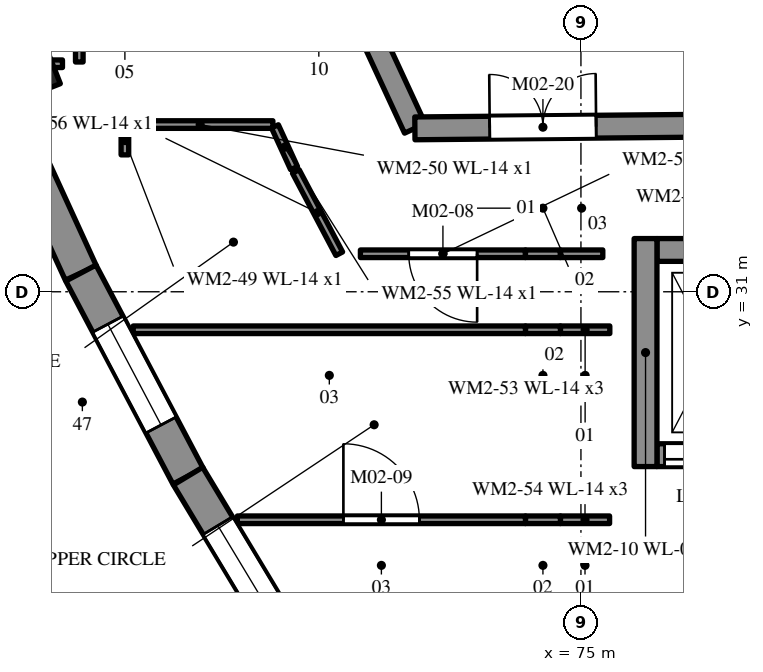
"""IFC4 building model, lengths in metres.
Left out: names, types, materials, properties, quantities, classifications, styles, units other than length and angle.
Written with IfcOpenShell. Run it as: python <this file> out.ifc"""

import sys

from ifc_helpers import new_model, si_unit, direction, frame, frame_2d, origin, origin_2d, place, context, subcontext, project, spatial, rectangle, extrude, element, fill, save


model = new_model("IFC4")
c1 = context("Model", 3, precision=1e-05, world=origin(), true_north=direction((0.0, 1.0)))
c2 = subcontext(c1, "Body", "Model", "MODEL_VIEW")
j1 = project(units=[si_unit("LENGTHUNIT", "METRE"), si_unit("PLANEANGLEUNIT", "RADIAN")], contexts=[c1])
p1 = place(None, origin())
s1 = spatial("IfcSite", under=j1, at=p1, CompositionType="ELEMENT")
p2 = place(p1, origin())
s2 = spatial("IfcBuilding", under=s1, at=p2, CompositionType="ELEMENT")
p3 = place(p2, frame((0.0, 0.0, 10.2)))
s3 = spatial("IfcBuildingStorey", under=s2, at=p3, CompositionType="ELEMENT", Elevation=10.2)
p4 = place(p3, frame((67.163, 33.993, 0.0), z_axis=(0.0, 0.0, 1.0), x_axis=(0.416407051835, -0.909178292296, 0.0)))
e1 = element("IfcWall", 1, at=p4, inside=s3, PredefinedType="SOLIDWALL", context=c2, shape_type="SweptSolid", body=[
    extrude(rectangle(XDim=3.021, YDim=0.45, at=frame_2d((1.511, 0.0))), origin(), (0.0, 0.0, 1.0), 4.6),
])
p5 = place(p3, frame((68.421, 31.246, 0.0), z_axis=(0.0, 0.0, 1.0), x_axis=(0.466728769487, -0.884400506407, 0.0)))
e2 = element("IfcWall", 2, at=p5, inside=s3, PredefinedType="SOLIDWALL", context=c2, shape_type="SweptSolid", body=[
    extrude(rectangle(XDim=3.021, YDim=0.45, at=frame_2d((1.51, 0.0))), origin(), (0.0, 0.0, 1.0), 4.6),
])
p6 = place(p5, frame((0.76, 0.0, 0.9)))
e3 = element("IfcOpeningElement", 3, at=p6, cuts=e2, PredefinedType="OPENING", context=c2, shape_type="SweptSolid", body=[
    extrude(rectangle(XDim=1.5, YDim=2.1, at=frame_2d((0.75, 1.05))), frame((0.0, 0.235, 0.0), z_axis=(0.0, -1.0, 0.0), x_axis=(1.0, 0.0, 0.0)), (0.0, 0.0, 1.0), 0.47),
])
p7 = place(p3, frame((69.831, 28.575, 0.0), z_axis=(0.0, 0.0, 1.0), x_axis=(0.515636119523, -0.856807675177, 0.0)))
e4 = element("IfcWall", 4, at=p7, inside=s3, PredefinedType="SOLIDWALL", context=c2, shape_type="SweptSolid", body=[
    extrude(rectangle(XDim=3.021, YDim=0.45, at=frame_2d((1.511, 0.0))), origin(), (0.0, 0.0, 1.0), 4.6),
])
p8 = place(p7, frame((0.76, 0.0, 0.9)))
e5 = element("IfcOpeningElement", 5, at=p8, cuts=e4, PredefinedType="OPENING", context=c2, shape_type="SweptSolid", body=[
    extrude(rectangle(XDim=1.5, YDim=2.1, at=frame_2d((0.75, 1.05))), frame((0.0, 0.235, 0.0), z_axis=(0.0, -1.0, 0.0), x_axis=(1.0, 0.0, 0.0)), (0.0, 0.0, 1.0), 0.47),
])
p9 = place(p3, frame((71.558, 35.865, 0.0), z_axis=(0.0, 0.0, 1.0), x_axis=(0.420315192535, -0.907378167538, 0.0)))
e6 = element("IfcWall", 6, at=p9, inside=s3, PredefinedType="SHEAR", context=c2, shape_type="SweptSolid", body=[
    extrude(rectangle(XDim=2.992, YDim=0.3, at=frame_2d((1.496, 0.0))), origin(), (0.0, 0.0, 1.0), 4.6),
])
p10 = place(p3, frame((72.815, 33.15, 0.0), z_axis=(0.0, 0.0, 1.0), x_axis=(0.999957788763, 0.009188073348, 0.0)))
e7 = element("IfcWall", 7, at=p10, inside=s3, PredefinedType="SHEAR", context=c2, shape_type="SweptSolid", body=[
    extrude(rectangle(XDim=22.479, YDim=0.3, at=frame_2d((11.24, 0.0))), origin(), (0.0, 0.0, 1.0), 4.6),
])
p11 = place(p10, frame((0.985, 0.0, 0.0)))
e8 = element("IfcOpeningElement", 8, at=p11, cuts=e7, PredefinedType="OPENING", context=c2, shape_type="SweptSolid", body=[
    extrude(rectangle(XDim=1.4, YDim=2.1, at=frame_2d((0.7, 1.05))), frame((0.0, 0.16, 0.0), z_axis=(0.0, -1.0, 0.0), x_axis=(1.0, 0.0, 0.0)), (0.0, 0.0, 1.0), 0.32),
])
p12 = place(p10, frame((10.485, 0.0, 0.0)))
e9 = element("IfcOpeningElement", 9, at=p12, cuts=e7, PredefinedType="OPENING", context=c2, shape_type="SweptSolid", body=[
    extrude(rectangle(XDim=1.4, YDim=2.1, at=frame_2d((0.7, 1.05))), frame((0.0, 0.16, 0.0), z_axis=(0.0, -1.0, 0.0), x_axis=(1.0, 0.0, 0.0)), (0.0, 0.0, 1.0), 0.32),
])
p13 = place(p10, frame((19.985, 0.0, 0.0)))
e10 = element("IfcOpeningElement", 10, at=p13, cuts=e7, PredefinedType="OPENING", context=c2, shape_type="SweptSolid", body=[
    extrude(rectangle(XDim=1.4, YDim=2.1, at=frame_2d((0.7, 1.05))), frame((0.0, 0.16, 0.0), z_axis=(0.0, -1.0, 0.0), x_axis=(1.0, 0.0, 0.0)), (0.0, 0.0, 1.0), 0.32),
])
p14 = place(p3, frame((67.651, 34.186, 0.0), z_axis=(0.0, 0.0, 1.0), x_axis=(0.366955870742, -0.930238350601, 0.0)))
e11 = element("IfcColumn", 11, at=p14, inside=s3, PredefinedType="PILASTER", context=c2, shape_type="SweptSolid", body=[
    extrude(rectangle(XDim=1.2, YDim=0.6, at=origin_2d()), origin(), (0.0, 0.0, 1.0), 4.6),
])
p15 = place(p3, frame((76.0, 28.85, 0.0), z_axis=(0.0, 0.0, 1.0), x_axis=(1.0, 0.0, 0.0)))
e12 = element("IfcWall", 12, at=p15, inside=s3, PredefinedType="SHEAR", context=c2, shape_type="SweptSolid", body=[
    extrude(rectangle(XDim=1.5, YDim=0.3, at=frame_2d((0.75, 0.0))), origin(), (0.0, 0.0, 1.0), 4.6),
])
p16 = place(p15, frame((0.1, 0.0, 0.0)))
e13 = element("IfcOpeningElement", 13, at=p16, cuts=e12, PredefinedType="OPENING", context=c2, shape_type="SweptSolid", body=[
    extrude(rectangle(XDim=1.3, YDim=2.3, at=frame_2d((0.65, 1.15))), frame((0.0, 0.16, 0.0), z_axis=(0.0, -1.0, 0.0), x_axis=(1.0, 0.0, 0.0)), (0.0, 0.0, 1.0), 0.32),
])
p17 = place(p3, frame((77.5, 31.55, 0.0), z_axis=(0.0, 0.0, 1.0), x_axis=(-1.0, 0.0, 0.0)))
e14 = element("IfcWall", 14, at=p17, inside=s3, PredefinedType="SHEAR", context=c2, shape_type="SweptSolid", body=[
    extrude(rectangle(XDim=1.5, YDim=0.3, at=frame_2d((0.75, 0.0))), origin(), (0.0, 0.0, 1.0), 4.6),
])
p18 = place(p3, frame((75.85, 31.7, 0.0), z_axis=(0.0, 0.0, 1.0), x_axis=(0.0, -1.0, 0.0)))
e15 = element("IfcWall", 15, at=p18, inside=s3, PredefinedType="SHEAR", context=c2, shape_type="SweptSolid", body=[
    extrude(rectangle(XDim=3.0, YDim=0.3, at=frame_2d((1.5, 0.0))), origin(), (0.0, 0.0, 1.0), 4.6),
])
p19 = place(p3, frame((68.179, 34.0, 0.0), z_axis=(0.0, 0.0, 1.0), x_axis=(-1.0, 0.0, 0.0)))
e16 = element("IfcWall", 16, at=p19, inside=s3, PredefinedType="PARTITIONING", context=c2, shape_type="SweptSolid", body=[
    extrude(rectangle(XDim=0.731, YDim=0.1, at=frame_2d((0.366, 0.0))), origin(), (0.0, 0.0, 1.0), 4.35),
])
p20 = place(p3, frame((68.4, 34.82, 0.0), z_axis=(0.0, 0.0, 1.0), x_axis=(0.0, -1.0, 0.0)))
e17 = element("IfcWall", 17, at=p20, inside=s3, PredefinedType="PARTITIONING", context=c2, shape_type="SweptSolid", body=[
    extrude(rectangle(XDim=0.797, YDim=0.1, at=frame_2d((0.398, 0.0))), origin(), (0.0, 0.0, 1.0), 4.35),
])
p21 = place(p3, frame((69.0, 32.801, 0.0), z_axis=(0.0, 0.0, 1.0), x_axis=(0.0, 1.0, 0.0)))
e18 = element("IfcWall", 18, at=p21, inside=s3, PredefinedType="PARTITIONING", context=c2, shape_type="SweptSolid", body=[
    extrude(rectangle(XDim=0.375, YDim=0.1, at=frame_2d((0.188, 0.0))), origin(), (0.0, 0.0, 1.0), 4.35),
])
p22 = place(p3, frame((69.033, 33.2, 0.0), z_axis=(0.0, 0.0, 1.0), x_axis=(1.0, 0.0, 0.0)))
e19 = element("IfcWall", 19, at=p22, inside=s3, PredefinedType="PARTITIONING", context=c2, shape_type="SweptSolid", body=[
    extrude(rectangle(XDim=1.914, YDim=0.1, at=frame_2d((0.957, 0.0))), origin(), (0.0, 0.0, 1.0), 4.35),
])
p23 = place(p3, frame((75.38, 30.5, 0.0), z_axis=(0.0, 0.0, 1.0), x_axis=(-1.0, 0.0, 0.0)))
e20 = element("IfcWall", 20, at=p23, inside=s3, PredefinedType="PARTITIONING", context=c2, shape_type="SweptSolid", body=[
    extrude(rectangle(XDim=0.65, YDim=0.1, at=frame_2d((0.325, 0.0))), origin(), (0.0, 0.0, 1.0), 4.35),
])
p24 = place(p3, frame((74.73, 30.5, 0.0), z_axis=(0.0, 0.0, 1.0), x_axis=(-1.0, 0.0, 0.0)))
e21 = element("IfcWall", 21, at=p24, inside=s3, PredefinedType="PARTITIONING", context=c2, shape_type="SweptSolid", body=[
    extrude(rectangle(XDim=0.46, YDim=0.1, at=frame_2d((0.23, 0.0))), origin(), (0.0, 0.0, 1.0), 3.52),
])
p25 = place(p3, frame((74.27, 30.5, 0.0), z_axis=(0.0, 0.0, 1.0), x_axis=(-1.0, 0.0, 0.0)))
e22 = element("IfcWall", 22, at=p25, inside=s3, PredefinedType="PARTITIONING", context=c2, shape_type="SweptSolid", body=[
    extrude(rectangle(XDim=5.161, YDim=0.1, at=frame_2d((2.581, 0.0))), origin(), (0.0, 0.0, 1.0), 4.35),
])
p26 = place(p3, frame((75.377, 28.0, 0.0), z_axis=(0.0, 0.0, 1.0), x_axis=(-1.0, 0.0, 0.0)))
e23 = element("IfcWall", 23, at=p26, inside=s3, PredefinedType="PARTITIONING", context=c2, shape_type="SweptSolid", body=[
    extrude(rectangle(XDim=0.647, YDim=0.1, at=frame_2d((0.323, 0.0))), origin(), (0.0, 0.0, 1.0), 4.35),
])
p27 = place(p3, frame((74.73, 28.0, 0.0), z_axis=(0.0, 0.0, 1.0), x_axis=(-1.0, 0.0, 0.0)))
e24 = element("IfcWall", 24, at=p27, inside=s3, PredefinedType="PARTITIONING", context=c2, shape_type="SweptSolid", body=[
    extrude(rectangle(XDim=0.46, YDim=0.1, at=frame_2d((0.23, 0.0))), origin(), (0.0, 0.0, 1.0), 3.52),
])
p28 = place(p3, frame((74.27, 28.0, 0.0), z_axis=(0.0, 0.0, 1.0), x_axis=(-1.0, 0.0, 0.0)))
e25 = element("IfcWall", 25, at=p28, inside=s3, PredefinedType="PARTITIONING", context=c2, shape_type="SweptSolid", body=[
    extrude(rectangle(XDim=3.791, YDim=0.1, at=frame_2d((1.896, 0.0))), origin(), (0.0, 0.0, 1.0), 4.35),
])
p29 = place(p28, frame((1.395, 0.0, 0.0)))
e26 = element("IfcOpeningElement", 26, at=p29, cuts=e25, PredefinedType="OPENING", context=c2, shape_type="SweptSolid", body=[
    extrude(rectangle(XDim=1.0, YDim=2.1, at=frame_2d((0.5, 1.05))), frame((0.0, 0.06, 0.0), z_axis=(0.0, -1.0, 0.0), x_axis=(1.0, 0.0, 0.0)), (0.0, 0.0, 1.0), 0.12),
])
p30 = place(p3, frame((70.974, 33.177, 0.0), z_axis=(0.0, 0.0, 1.0), x_axis=(0.416055955945, -0.909339013527, 0.0)))
e27 = element("IfcWall", 27, at=p30, inside=s3, PredefinedType="PARTITIONING", context=c2, shape_type="SweptSolid", body=[
    extrude(rectangle(XDim=0.604, YDim=0.1, at=frame_2d((0.302, 0.0))), origin(), (0.0, 0.0, 1.0), 4.35),
])
p31 = place(p3, frame((71.249, 32.583, 0.0), z_axis=(0.0, 0.0, 1.0), x_axis=(0.466970962101, -0.884272650575, 0.0)))
e28 = element("IfcWall", 28, at=p31, inside=s3, PredefinedType="PARTITIONING", context=c2, shape_type="SweptSolid", body=[
    extrude(rectangle(XDim=1.224, YDim=0.1, at=frame_2d((0.612, 0.0))), origin(), (0.0, 0.0, 1.0), 4.35),
])
p32 = place(p3, frame((72.098, 31.5, 0.0), z_axis=(0.0, 0.0, 1.0), x_axis=(1.0, 0.0, 0.0)))
e29 = element("IfcWall", 29, at=p32, inside=s3, PredefinedType="PARTITIONING", context=c2, shape_type="SweptSolid", body=[
    extrude(rectangle(XDim=2.172, YDim=0.1, at=frame_2d((1.086, 0.0))), origin(), (0.0, 0.0, 1.0), 4.35),
])
p33 = place(p32, frame((0.636, 0.0, 0.0)))
e30 = element("IfcOpeningElement", 30, at=p33, cuts=e29, PredefinedType="OPENING", context=c2, shape_type="SweptSolid", body=[
    extrude(rectangle(XDim=0.9, YDim=2.1, at=frame_2d((0.45, 1.05))), frame((0.0, 0.06, 0.0), z_axis=(0.0, -1.0, 0.0), x_axis=(1.0, 0.0, 0.0)), (0.0, 0.0, 1.0), 0.12),
])
p34 = place(p3, frame((74.27, 31.5, 0.0), z_axis=(0.0, 0.0, 1.0), x_axis=(1.0, 0.0, 0.0)))
e31 = element("IfcWall", 31, at=p34, inside=s3, PredefinedType="PARTITIONING", context=c2, shape_type="SweptSolid", body=[
    extrude(rectangle(XDim=0.46, YDim=0.1, at=frame_2d((0.23, 0.0))), origin(), (0.0, 0.0, 1.0), 3.52),
])
p35 = place(p3, frame((74.73, 31.5, 0.0), z_axis=(0.0, 0.0, 1.0), x_axis=(1.0, 0.0, 0.0)))
e32 = element("IfcWall", 32, at=p35, inside=s3, PredefinedType="PARTITIONING", context=c2, shape_type="SweptSolid", body=[
    extrude(rectangle(XDim=0.558, YDim=0.1, at=frame_2d((0.279, 0.0))), origin(), (0.0, 0.0, 1.0), 4.35),
])
p36 = place(p16, origin())
e33 = element("IfcDoor", 33, at=p36, inside=s3, OperationType="SLIDING_TO_LEFT", PredefinedType="DOOR", context=c2, shape_type="SweptSolid", body=[
    extrude(rectangle(XDim=1.3, YDim=2.3, at=frame_2d((0.65, 1.15))), frame((0.0, 0.025, 0.0), z_axis=(0.0, -1.0, 0.0), x_axis=(1.0, 0.0, 0.0)), (0.0, 0.0, 1.0), 0.05),
])
fill(e13, e33)
p37 = place(p6, origin())
e34 = element("IfcWindow", 34, at=p37, inside=s3, PartitioningType="SINGLE_PANEL", PredefinedType="WINDOW", context=c2, shape_type="SweptSolid", body=[
    extrude(rectangle(XDim=1.5, YDim=2.1, at=frame_2d((0.75, 1.05))), frame((0.0, 0.03, 0.0), z_axis=(0.0, -1.0, 0.0), x_axis=(1.0, 0.0, 0.0)), (0.0, 0.0, 1.0), 0.06),
])
fill(e3, e34)
p38 = place(p8, origin())
e35 = element("IfcWindow", 35, at=p38, inside=s3, PartitioningType="SINGLE_PANEL", PredefinedType="WINDOW", context=c2, shape_type="SweptSolid", body=[
    extrude(rectangle(XDim=1.5, YDim=2.1, at=frame_2d((0.75, 1.05))), frame((0.0, 0.03, 0.0), z_axis=(0.0, -1.0, 0.0), x_axis=(1.0, 0.0, 0.0)), (0.0, 0.0, 1.0), 0.06),
])
fill(e5, e35)
p39 = place(p33, frame((0.9, 0.0, 0.0), z_axis=(0.0, 0.0, 1.0), x_axis=(-1.0, 0.0, 0.0)))
e36 = element("IfcDoor", 36, at=p39, inside=s3, OperationType="SINGLE_SWING_LEFT", PredefinedType="DOOR", context=c2, shape_type="SweptSolid", body=[
    extrude(rectangle(XDim=0.9, YDim=2.1, at=frame_2d((0.45, 1.05))), frame((0.0, 0.025, 0.0), z_axis=(0.0, -1.0, 0.0), x_axis=(1.0, 0.0, 0.0)), (0.0, 0.0, 1.0), 0.05),
])
fill(e30, e36)
p40 = place(p29, frame((1.0, 0.0, 0.0), z_axis=(0.0, 0.0, 1.0), x_axis=(-1.0, 0.0, 0.0)))
e37 = element("IfcDoor", 37, at=p40, inside=s3, OperationType="SINGLE_SWING_LEFT", PredefinedType="DOOR", context=c2, shape_type="SweptSolid", body=[
    extrude(rectangle(XDim=1.0, YDim=2.1, at=frame_2d((0.5, 1.05))), frame((0.0, 0.025, 0.0), z_axis=(0.0, -1.0, 0.0), x_axis=(1.0, 0.0, 0.0)), (0.0, 0.0, 1.0), 0.05),
])
fill(e26, e37)
p41 = place(p11, origin())
e38 = element("IfcDoor", 38, at=p41, inside=s3, OperationType="DOUBLE_DOOR_SINGLE_SWING", PredefinedType="DOOR", context=c2, shape_type="SweptSolid", body=[
    extrude(rectangle(XDim=1.4, YDim=2.1, at=frame_2d((0.7, 1.05))), frame((0.0, 0.025, 0.0), z_axis=(0.0, -1.0, 0.0), x_axis=(1.0, 0.0, 0.0)), (0.0, 0.0, 1.0), 0.05),
])
fill(e8, e38)
save(model, sys.argv[1])
